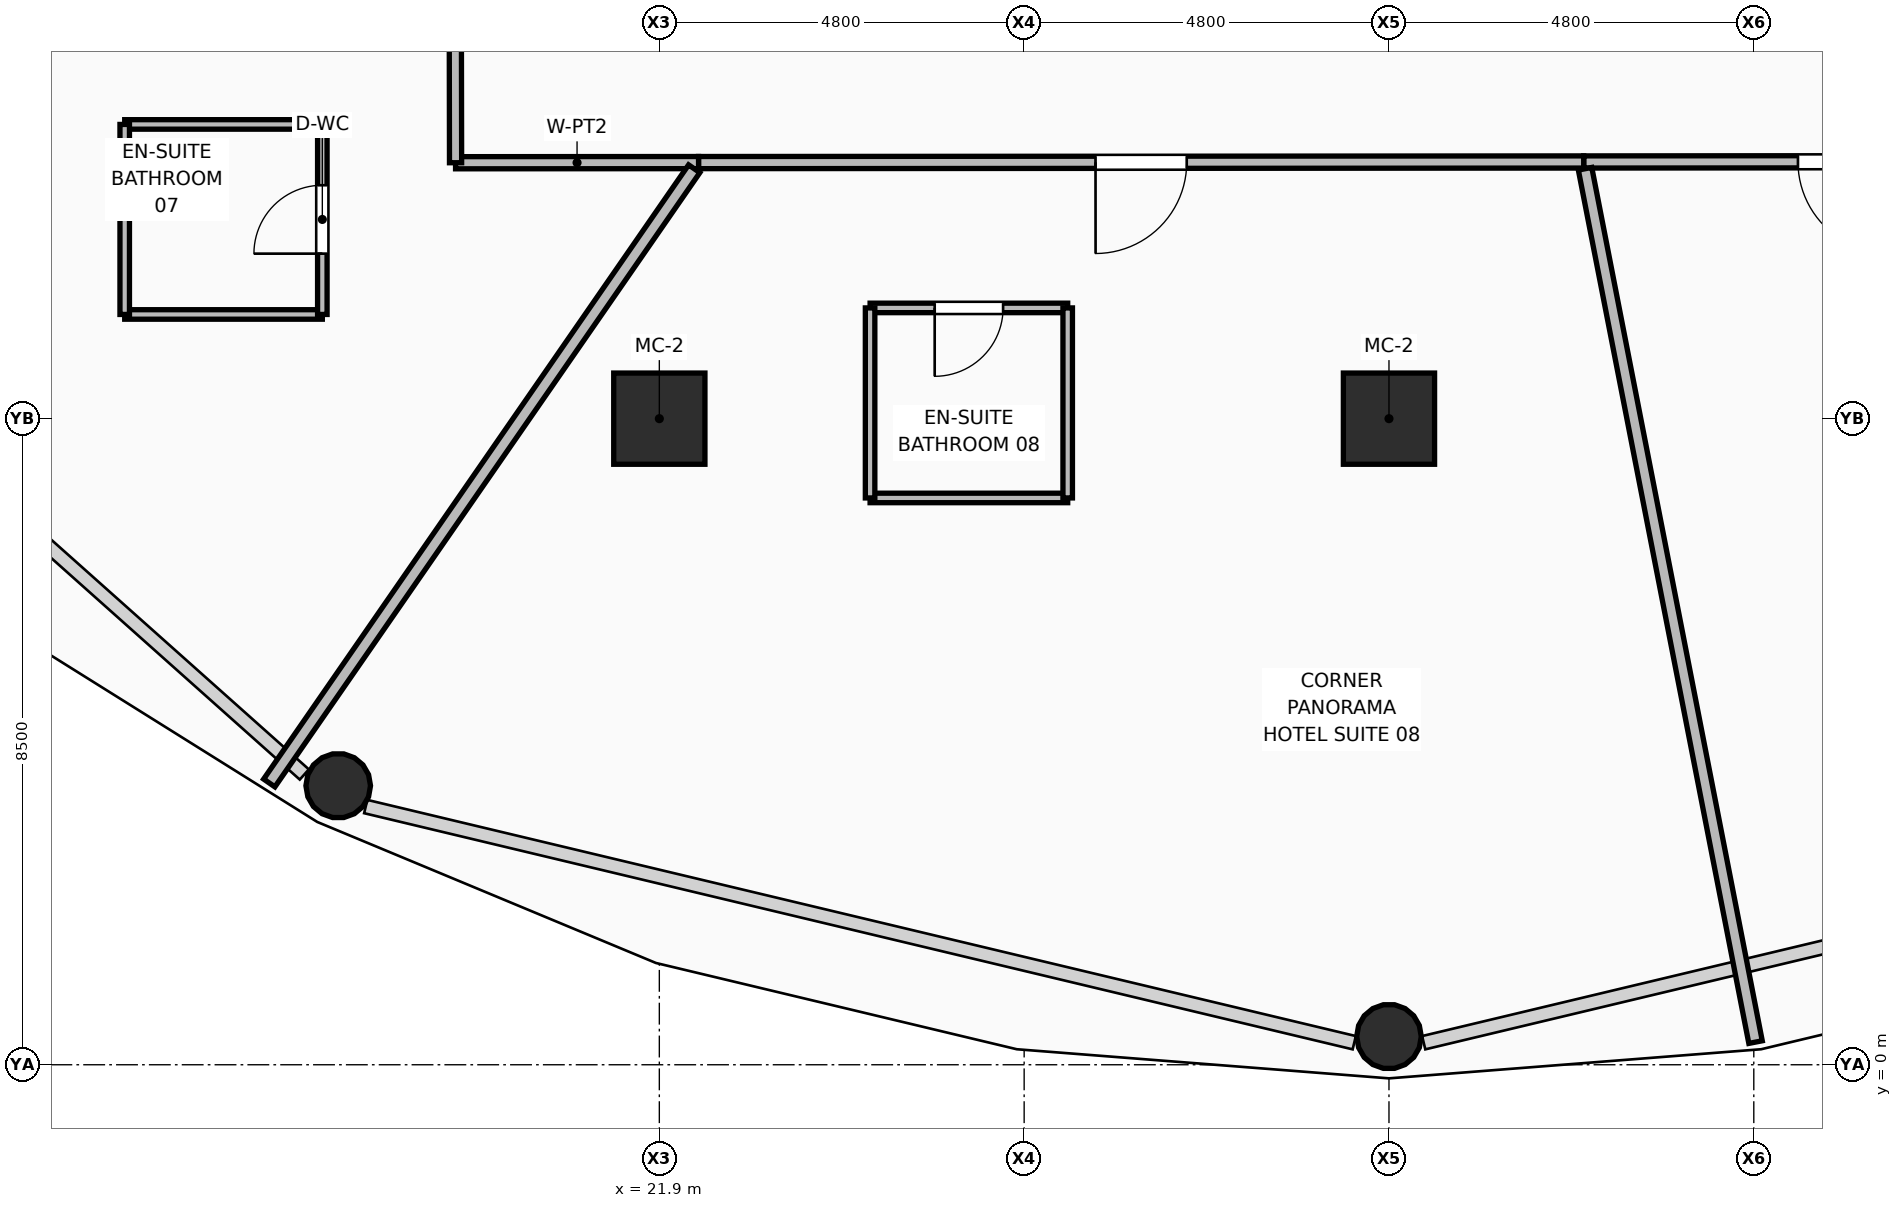
"""IFC4 building model, lengths in metres.
Left out: names, types, materials, properties, quantities, classifications, styles, units other than length and angle.
Written with IfcOpenShell. Run it as: python <this file> out.ifc"""

import sys

from ifc_helpers import new_model, si_unit, direction, frame, frame_2d, origin, origin_2d, place, context, subcontext, project, spatial, rectangle, hollow_rectangle, hollow_circle, extrude, element, fill, save


model = new_model("IFC4")
c1 = context("Model", 3, precision=1e-05, world=origin(), true_north=direction((0.0, 1.0)))
c2 = subcontext(c1, "Body", "Model", "MODEL_VIEW")
j1 = project(units=[si_unit("LENGTHUNIT", "METRE"), si_unit("PLANEANGLEUNIT", "RADIAN")], contexts=[c1])
p1 = place(None, origin())
s1 = spatial("IfcSite", under=j1, at=p1, CompositionType="ELEMENT")
p2 = place(p1, origin())
s2 = spatial("IfcBuilding", under=s1, at=p2, CompositionType="ELEMENT")
p3 = place(p2, frame((0.0, 0.0, 72.0)))
s3 = spatial("IfcBuildingStorey", under=s2, at=p3, CompositionType="ELEMENT", Elevation=72.0)
for number, where, z_axis, x_axis in (
    (1, (21.9, 8.5, 0.0), (0.0, 0.0, 1.0), (1.0, 0.0, 0.0)),
    (2, (31.5, 8.5, 0.0), (0.0, 0.0, 1.0), (1.0, 0.0, 0.0)),
):
    element("IfcColumn", number, at=place(p3, frame(where, z_axis=z_axis, x_axis=x_axis)), inside=s3, PredefinedType="COLUMN", context=c2, shape_type="SweptSolid", body=[
        extrude(hollow_rectangle(XDim=1.2, YDim=1.2, WallThickness=0.045, at=origin_2d()), origin(), (0.0, 0.0, 1.0), 3.75),
    ])
for number, where, z_axis, x_axis in (
    (3, (17.675, 3.671, 0.0), (0.0, 0.0, 1.0), (1.0, 0.0, 0.0)),
    (4, (31.5, 0.371, 0.0), (0.0, 0.0, 1.0), (1.0, 0.0, 0.0)),
):
    element("IfcColumn", number, at=place(p3, frame(where, z_axis=z_axis, x_axis=x_axis)), inside=s3, PredefinedType="COLUMN", context=c2, shape_type="SweptSolid", body=[
        extrude(hollow_circle(Radius=0.425, WallThickness=0.04, at=origin_2d()), origin(), (0.0, 0.0, 1.0), 3.57),
    ])
p4 = place(p3, frame((40.753, 11.882, 0.0), z_axis=(0.0, 0.0, 1.0), x_axis=(-0.999999706426, -0.00076625534, 0.0)))
e5 = element("IfcWall", 5, at=p4, inside=s3, PredefinedType="PARTITIONING", context=c2, shape_type="SweptSolid", body=[
    extrude(rectangle(XDim=6.691, YDim=0.16, at=frame_2d((3.345, 0.0))), origin(), (0.0, 0.0, 1.0), 3.55),
])
p5 = place(p4, frame((2.672, 0.0, 0.0)))
e6 = element("IfcOpeningElement", 6, at=p5, cuts=e5, PredefinedType="OPENING", context=c2, shape_type="SweptSolid", body=[
    extrude(rectangle(XDim=1.2, YDim=2.1, at=frame_2d((0.6, 1.05))), frame((0.0, 0.09, 0.0), z_axis=(0.0, -1.0, 0.0), x_axis=(1.0, 0.0, 0.0)), (0.0, 0.0, 1.0), 0.18),
])
p6 = place(p3, frame((34.062, 11.877, 0.0), z_axis=(0.0, 0.0, 1.0), x_axis=(-0.99999976071, -0.000691794728, 0.0)))
e7 = element("IfcWall", 7, at=p6, inside=s3, PredefinedType="PARTITIONING", context=c2, shape_type="SweptSolid", body=[
    extrude(rectangle(XDim=11.646, YDim=0.16, at=frame_2d((5.823, 0.0))), origin(), (0.0, 0.0, 1.0), 2.928),
])
p7 = place(p6, frame((5.223, 0.0, 0.0)))
e8 = element("IfcOpeningElement", 8, at=p7, cuts=e7, PredefinedType="OPENING", context=c2, shape_type="SweptSolid", body=[
    extrude(rectangle(XDim=1.2, YDim=2.1, at=frame_2d((0.6, 1.05))), frame((0.0, 0.09, 0.0), z_axis=(0.0, -1.0, 0.0), x_axis=(1.0, 0.0, 0.0)), (0.0, 0.0, 1.0), 0.18),
])
p8 = place(p3, frame((22.416, 11.869, 0.0), z_axis=(0.0, 0.0, 1.0), x_axis=(-0.999999813388, -0.000610920085, 0.0)))
e9 = element("IfcWall", 9, at=p8, inside=s3, PredefinedType="PARTITIONING", context=c2, shape_type="SweptSolid", body=[
    extrude(rectangle(XDim=3.197, YDim=0.16, at=frame_2d((1.599, 0.0))), origin(), (0.0, 0.0, 1.0), 2.928),
])
p9 = place(p3, frame((19.219, 11.867, 0.0), z_axis=(0.0, 0.0, 1.0), x_axis=(-0.001717915349, 0.999998524382, 0.0)))
e10 = element("IfcWall", 10, at=p9, inside=s3, PredefinedType="PARTITIONING", context=c2, shape_type="SweptSolid", body=[
    extrude(rectangle(XDim=9.948, YDim=0.16, at=frame_2d((4.974, 0.0))), origin(), (0.0, 0.0, 1.0), 2.928),
])
p10 = place(p9, frame((8.144, 0.0, 0.0)))
e11 = element("IfcOpeningElement", 11, at=p10, cuts=e10, PredefinedType="OPENING", context=c2, shape_type="SweptSolid", body=[
    extrude(rectangle(XDim=1.2, YDim=2.1, at=frame_2d((0.6, 1.05))), frame((0.0, 0.09, 0.0), z_axis=(0.0, -1.0, 0.0), x_axis=(1.0, 0.0, 0.0)), (0.0, 0.0, 1.0), 0.18),
])
p11 = place(p3, frame((22.359, 11.788, 0.0), z_axis=(0.0, 0.0, 1.0), x_axis=(-0.568951562239, -0.822371035376, 0.0)))
e12 = element("IfcWall", 12, at=p11, inside=s3, PredefinedType="PARTITIONING", context=c2, shape_type="SweptSolid", body=[
    extrude(rectangle(XDim=9.826, YDim=0.18, at=frame_2d((4.913, 0.0))), origin(), (0.0, 0.0, 1.0), 2.775),
])
p12 = place(p3, frame((34.08, 11.788, 0.0), z_axis=(0.0, 0.0, 1.0), x_axis=(0.191590227311, -0.981475004674, 0.0)))
e13 = element("IfcWall", 13, at=p12, inside=s3, PredefinedType="PARTITIONING", context=c2, shape_type="SweptSolid", body=[
    extrude(rectangle(XDim=11.707, YDim=0.18, at=frame_2d((5.854, 0.0))), origin(), (0.0, 0.0, 1.0), 2.775),
])
for number, where, z_axis, x_axis in (
    (14, (14.866, 9.871, 0.0), (0.0, 0.0, 1.0), (1.0, 0.0, 0.0)),
    (15, (14.866, 12.371, 0.0), (0.0, 0.0, 1.0), (1.0, 0.0, 0.0)),
):
    element("IfcWall", number, at=place(p3, frame(where, z_axis=z_axis, x_axis=x_axis)), inside=s3, PredefinedType="PARTITIONING", context=c2, shape_type="SweptSolid", body=[
        extrude(rectangle(XDim=2.6, YDim=0.125, at=frame_2d((1.3, 0.0))), origin(), (0.0, 0.0, 1.0), 3.55),
    ])
p13 = place(p3, frame((14.866, 9.871, 0.0), z_axis=(0.0, 0.0, 1.0), x_axis=(0.0, 1.0, 0.0)))
e16 = element("IfcWall", 16, at=p13, inside=s3, PredefinedType="PARTITIONING", context=c2, shape_type="SweptSolid", body=[
    extrude(rectangle(XDim=2.5, YDim=0.125, at=frame_2d((1.25, 0.0))), origin(), (0.0, 0.0, 1.0), 3.55),
])
p14 = place(p3, frame((17.466, 9.871, 0.0), z_axis=(0.0, 0.0, 1.0), x_axis=(0.0, 1.0, 0.0)))
e17 = element("IfcWall", 17, at=p14, inside=s3, PredefinedType="PARTITIONING", context=c2, shape_type="SweptSolid", body=[
    extrude(rectangle(XDim=2.5, YDim=0.125, at=frame_2d((1.25, 0.0))), origin(), (0.0, 0.0, 1.0), 3.55),
])
p15 = place(p14, frame((0.8, 0.0, 0.0)))
e18 = element("IfcOpeningElement", 18, at=p15, cuts=e17, PredefinedType="OPENING", context=c2, shape_type="SweptSolid", body=[
    extrude(rectangle(XDim=0.9, YDim=2.1, at=frame_2d((0.45, 1.05))), frame((0.0, 0.073, 0.0), z_axis=(0.0, -1.0, 0.0), x_axis=(1.0, 0.0, 0.0)), (0.0, 0.0, 1.0), 0.145),
])
p16 = place(p3, frame((24.673, 7.457, 0.0), z_axis=(0.0, 0.0, 1.0), x_axis=(1.0, 0.0, 0.0)))
e19 = element("IfcWall", 19, at=p16, inside=s3, PredefinedType="PARTITIONING", context=c2, shape_type="SweptSolid", body=[
    extrude(rectangle(XDim=2.6, YDim=0.125, at=frame_2d((1.3, 0.0))), origin(), (0.0, 0.0, 1.0), 3.55),
])
p17 = place(p3, frame((24.673, 9.957, 0.0), z_axis=(0.0, 0.0, 1.0), x_axis=(1.0, 0.0, 0.0)))
e20 = element("IfcWall", 20, at=p17, inside=s3, PredefinedType="PARTITIONING", context=c2, shape_type="SweptSolid", body=[
    extrude(rectangle(XDim=2.6, YDim=0.125, at=frame_2d((1.3, 0.0))), origin(), (0.0, 0.0, 1.0), 3.55),
])
p18 = place(p17, frame((0.85, 0.0, 0.0)))
e21 = element("IfcOpeningElement", 21, at=p18, cuts=e20, PredefinedType="OPENING", context=c2, shape_type="SweptSolid", body=[
    extrude(rectangle(XDim=0.9, YDim=2.1, at=frame_2d((0.45, 1.05))), frame((0.0, 0.073, 0.0), z_axis=(0.0, -1.0, 0.0), x_axis=(1.0, 0.0, 0.0)), (0.0, 0.0, 1.0), 0.145),
])
for number, where, z_axis, x_axis in (
    (22, (24.673, 7.457, 0.0), (0.0, 0.0, 1.0), (0.0, 1.0, 0.0)),
    (23, (27.273, 7.457, 0.0), (0.0, 0.0, 1.0), (0.0, 1.0, 0.0)),
):
    element("IfcWall", number, at=place(p3, frame(where, z_axis=z_axis, x_axis=x_axis)), inside=s3, PredefinedType="PARTITIONING", context=c2, shape_type="SweptSolid", body=[
        extrude(rectangle(XDim=2.5, YDim=0.125, at=frame_2d((1.25, 0.0))), origin(), (0.0, 0.0, 1.0), 3.55),
    ])
p19 = place(p15, origin())
e24 = element("IfcDoor", 24, at=p19, inside=s3, OperationType="SINGLE_SWING_LEFT", PredefinedType="DOOR", context=c2, shape_type="SweptSolid", body=[
    extrude(rectangle(XDim=0.9, YDim=2.1, at=frame_2d((0.45, 1.05))), frame((0.0, 0.025, 0.0), z_axis=(0.0, -1.0, 0.0), x_axis=(1.0, 0.0, 0.0)), (0.0, 0.0, 1.0), 0.05),
])
fill(e18, e24)
p20 = place(p18, frame((0.9, 0.0, 0.0), z_axis=(0.0, 0.0, 1.0), x_axis=(-1.0, 0.0, 0.0)))
e25 = element("IfcDoor", 25, at=p20, inside=s3, OperationType="SINGLE_SWING_RIGHT", PredefinedType="DOOR", context=c2, shape_type="SweptSolid", body=[
    extrude(rectangle(XDim=0.9, YDim=2.1, at=frame_2d((0.45, 1.05))), frame((0.0, 0.025, 0.0), z_axis=(0.0, -1.0, 0.0), x_axis=(1.0, 0.0, 0.0)), (0.0, 0.0, 1.0), 0.05),
])
fill(e21, e25)
p21 = place(p7, origin())
e26 = element("IfcDoor", 26, at=p21, inside=s3, OperationType="SINGLE_SWING_RIGHT", PredefinedType="DOOR", context=c2, shape_type="SweptSolid", body=[
    extrude(rectangle(XDim=1.2, YDim=2.1, at=frame_2d((0.6, 1.05))), frame((0.0, 0.025, 0.0), z_axis=(0.0, -1.0, 0.0), x_axis=(1.0, 0.0, 0.0)), (0.0, 0.0, 1.0), 0.05),
])
fill(e8, e26)
p22 = place(p5, origin())
e27 = element("IfcDoor", 27, at=p22, inside=s3, OperationType="SINGLE_SWING_LEFT", PredefinedType="DOOR", context=c2, shape_type="SweptSolid", body=[
    extrude(rectangle(XDim=1.2, YDim=2.1, at=frame_2d((0.6, 1.05))), frame((0.0, 0.025, 0.0), z_axis=(0.0, -1.0, 0.0), x_axis=(1.0, 0.0, 0.0)), (0.0, 0.0, 1.0), 0.05),
])
fill(e6, e27)
save(model, sys.argv[1])
